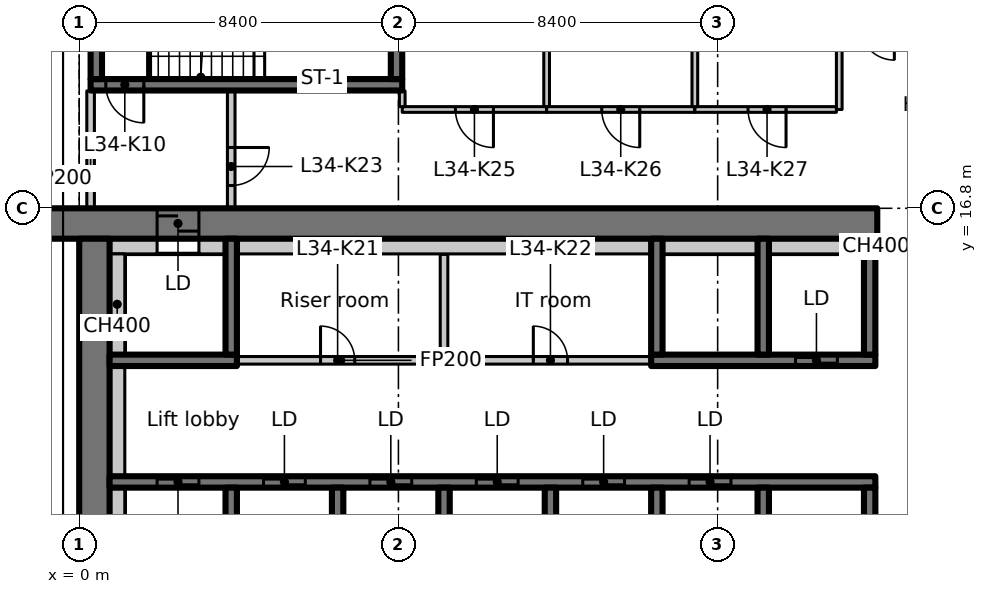
"""IFC4 building model, lengths in metres.
Left out: names, types, materials, properties, quantities, classifications, styles, units other than length and angle.
Written with IfcOpenShell. Run it as: python <this file> out.ifc"""

import sys

from ifc_helpers import new_model, si_unit, direction, frame, frame_2d, origin, place, context, subcontext, project, spatial, rectangle, extrude, element, fill, save


model = new_model("IFC4")
c1 = context("Model", 3, precision=1e-05, world=origin(), true_north=direction((0.0, 1.0)))
c2 = subcontext(c1, "Body", "Model", "MODEL_VIEW")
j1 = project(units=[si_unit("LENGTHUNIT", "METRE"), si_unit("PLANEANGLEUNIT", "RADIAN")], contexts=[c1])
p1 = place(None, origin())
s1 = spatial("IfcSite", under=j1, at=p1, CompositionType="ELEMENT")
p2 = place(p1, origin())
s2 = spatial("IfcBuilding", under=s1, at=p2, CompositionType="ELEMENT")
p3 = place(p2, frame((0.0, 0.0, 138.5)))
s3 = spatial("IfcBuildingStorey", under=s2, at=p3, CompositionType="ELEMENT", Elevation=138.5)
p4 = place(p3, frame((-1.1, 16.4, 0.0), z_axis=(0.0, 0.0, 1.0), x_axis=(1.0, 0.0, 0.0)))
e1 = element("IfcWall", 1, at=p4, inside=s3, PredefinedType="SHEAR", context=c2, shape_type="SweptSolid", body=[
    extrude(rectangle(XDim=22.1, YDim=0.8, at=frame_2d((11.05, 0.0))), origin(), (0.0, 0.0, 1.0), 3.35),
])
p5 = place(p4, frame((3.15, 0.0, 0.0)))
e2 = element("IfcOpeningElement", 2, at=p5, cuts=e1, PredefinedType="OPENING", context=c2, shape_type="SweptSolid", body=[
    extrude(rectangle(XDim=1.1, YDim=2.3, at=frame_2d((0.55, 1.15))), frame((0.0, 0.41, 0.0), z_axis=(0.0, -1.0, 0.0), x_axis=(1.0, 0.0, 0.0)), (0.0, 0.0, 1.0), 0.82),
])
p6 = place(p3, frame((0.4, 7.136, 0.0), z_axis=(0.0, 0.0, 1.0), x_axis=(0.0, 1.0, 0.0)))
e3 = element("IfcWall", 3, at=p6, inside=s3, PredefinedType="SHEAR", context=c2, shape_type="SweptSolid", body=[
    extrude(rectangle(XDim=8.864, YDim=0.8, at=frame_2d((4.432, 0.0))), origin(), (0.0, 0.0, 1.0), 3.35),
])
p7 = place(p3, frame((0.8, 15.8, 0.0), z_axis=(0.0, 0.0, 1.0), x_axis=(1.0, 0.0, 0.0)))
e4 = element("IfcWall", 4, at=p7, inside=s3, PredefinedType="PARTITIONING", context=c2, shape_type="SweptSolid", body=[
    extrude(rectangle(XDim=1.25, YDim=0.4, at=frame_2d((0.625, 0.0))), origin(), (0.0, 0.0, 1.0), 3.35),
])
p8 = place(p3, frame((0.8, 9.6, 0.0), z_axis=(0.0, 0.0, 1.0), x_axis=(1.0, 0.0, 0.0)))
e5 = element("IfcWall", 5, at=p8, inside=s3, PredefinedType="SHEAR", context=c2, shape_type="SweptSolid", body=[
    extrude(rectangle(XDim=20.15, YDim=0.3, at=frame_2d((10.075, 0.0))), origin(), (0.0, 0.0, 1.0), 3.35),
])
p9 = place(p8, frame((1.25, 0.0, 0.0)))
e6 = element("IfcOpeningElement", 6, at=p9, cuts=e5, PredefinedType="OPENING", context=c2, shape_type="SweptSolid", body=[
    extrude(rectangle(XDim=1.1, YDim=2.3, at=frame_2d((0.55, 1.15))), frame((0.0, 0.16, 0.0), z_axis=(0.0, -1.0, 0.0), x_axis=(1.0, 0.0, 0.0)), (0.0, 0.0, 1.0), 0.32),
])
p10 = place(p8, frame((4.05, 0.0, 0.0)))
e7 = element("IfcOpeningElement", 7, at=p10, cuts=e5, PredefinedType="OPENING", context=c2, shape_type="SweptSolid", body=[
    extrude(rectangle(XDim=1.1, YDim=2.3, at=frame_2d((0.55, 1.15))), frame((0.0, 0.16, 0.0), z_axis=(0.0, -1.0, 0.0), x_axis=(1.0, 0.0, 0.0)), (0.0, 0.0, 1.0), 0.32),
])
p11 = place(p8, frame((6.85, 0.0, 0.0)))
e8 = element("IfcOpeningElement", 8, at=p11, cuts=e5, PredefinedType="OPENING", context=c2, shape_type="SweptSolid", body=[
    extrude(rectangle(XDim=1.1, YDim=2.3, at=frame_2d((0.55, 1.15))), frame((0.0, 0.16, 0.0), z_axis=(0.0, -1.0, 0.0), x_axis=(1.0, 0.0, 0.0)), (0.0, 0.0, 1.0), 0.32),
])
p12 = place(p8, frame((9.65, 0.0, 0.0)))
e9 = element("IfcOpeningElement", 9, at=p12, cuts=e5, PredefinedType="OPENING", context=c2, shape_type="SweptSolid", body=[
    extrude(rectangle(XDim=1.1, YDim=2.3, at=frame_2d((0.55, 1.15))), frame((0.0, 0.16, 0.0), z_axis=(0.0, -1.0, 0.0), x_axis=(1.0, 0.0, 0.0)), (0.0, 0.0, 1.0), 0.32),
])
p13 = place(p8, frame((12.45, 0.0, 0.0)))
e10 = element("IfcOpeningElement", 10, at=p13, cuts=e5, PredefinedType="OPENING", context=c2, shape_type="SweptSolid", body=[
    extrude(rectangle(XDim=1.1, YDim=2.3, at=frame_2d((0.55, 1.15))), frame((0.0, 0.16, 0.0), z_axis=(0.0, -1.0, 0.0), x_axis=(1.0, 0.0, 0.0)), (0.0, 0.0, 1.0), 0.32),
])
p14 = place(p8, frame((15.25, 0.0, 0.0)))
e11 = element("IfcOpeningElement", 11, at=p14, cuts=e5, PredefinedType="OPENING", context=c2, shape_type="SweptSolid", body=[
    extrude(rectangle(XDim=1.1, YDim=2.3, at=frame_2d((0.55, 1.15))), frame((0.0, 0.16, 0.0), z_axis=(0.0, -1.0, 0.0), x_axis=(1.0, 0.0, 0.0)), (0.0, 0.0, 1.0), 0.32),
])
for number, where, z_axis, x_axis in (
    (12, (4.0, 7.15, 0.0), (0.0, 0.0, 1.0), (0.0, 1.0, 0.0)),
    (13, (6.8, 7.15, 0.0), (0.0, 0.0, 1.0), (0.0, 1.0, 0.0)),
    (14, (9.6, 7.15, 0.0), (0.0, 0.0, 1.0), (0.0, 1.0, 0.0)),
    (15, (12.4, 7.15, 0.0), (0.0, 0.0, 1.0), (0.0, 1.0, 0.0)),
    (16, (15.2, 7.15, 0.0), (0.0, 0.0, 1.0), (0.0, 1.0, 0.0)),
    (17, (18.0, 7.15, 0.0), (0.0, 0.0, 1.0), (0.0, 1.0, 0.0)),
    (18, (20.8, 7.15, 0.0), (0.0, 0.0, 1.0), (0.0, 1.0, 0.0)),
):
    element("IfcWall", number, at=place(p3, frame(where, z_axis=z_axis, x_axis=x_axis)), inside=s3, PredefinedType="SHEAR", context=c2, shape_type="SweptSolid", body=[
        extrude(rectangle(XDim=2.3, YDim=0.3, at=frame_2d((1.15, 0.0))), origin(), (0.0, 0.0, 1.0), 3.35),
    ])
p15 = place(p3, frame((0.8, 12.8, 0.0), z_axis=(0.0, 0.0, 1.0), x_axis=(1.0, 0.0, 0.0)))
e19 = element("IfcWall", 19, at=p15, inside=s3, PredefinedType="SHEAR", context=c2, shape_type="SweptSolid", body=[
    extrude(rectangle(XDim=3.35, YDim=0.3, at=frame_2d((1.675, 0.0))), origin(), (0.0, 0.0, 1.0), 3.35),
])
p16 = place(p3, frame((4.0, 12.95, 0.0), z_axis=(0.0, 0.0, 1.0), x_axis=(0.0, 1.0, 0.0)))
e20 = element("IfcWall", 20, at=p16, inside=s3, PredefinedType="SHEAR", context=c2, shape_type="SweptSolid", body=[
    extrude(rectangle(XDim=3.05, YDim=0.3, at=frame_2d((1.525, 0.0))), origin(), (0.0, 0.0, 1.0), 3.35),
])
p17 = place(p3, frame((15.05, 12.8, 0.0), z_axis=(0.0, 0.0, 1.0), x_axis=(1.0, 0.0, 0.0)))
e21 = element("IfcWall", 21, at=p17, inside=s3, PredefinedType="SHEAR", context=c2, shape_type="SweptSolid", body=[
    extrude(rectangle(XDim=5.9, YDim=0.3, at=frame_2d((2.95, 0.0))), origin(), (0.0, 0.0, 1.0), 3.35),
])
p18 = place(p17, frame((3.8, 0.0, 0.0)))
e22 = element("IfcOpeningElement", 22, at=p18, cuts=e21, PredefinedType="OPENING", context=c2, shape_type="SweptSolid", body=[
    extrude(rectangle(XDim=1.1, YDim=2.3, at=frame_2d((0.55, 1.15))), frame((0.0, 0.16, 0.0), z_axis=(0.0, -1.0, 0.0), x_axis=(1.0, 0.0, 0.0)), (0.0, 0.0, 1.0), 0.32),
])
for number, where, z_axis, x_axis in (
    (23, (15.2, 12.95, 0.0), (0.0, 0.0, 1.0), (0.0, 1.0, 0.0)),
    (24, (18.0, 12.95, 0.0), (0.0, 0.0, 1.0), (0.0, 1.0, 0.0)),
    (25, (20.8, 12.95, 0.0), (0.0, 0.0, 1.0), (0.0, 1.0, 0.0)),
):
    element("IfcWall", number, at=place(p3, frame(where, z_axis=z_axis, x_axis=x_axis)), inside=s3, PredefinedType="SHEAR", context=c2, shape_type="SweptSolid", body=[
        extrude(rectangle(XDim=3.05, YDim=0.3, at=frame_2d((1.525, 0.0))), origin(), (0.0, 0.0, 1.0), 3.35),
    ])
p19 = place(p3, frame((8.5, 20.05, 0.0), z_axis=(0.0, 0.0, 1.0), x_axis=(-1.0, 0.0, 0.0)))
e26 = element("IfcWall", 26, at=p19, inside=s3, PredefinedType="SHEAR", context=c2, shape_type="SweptSolid", body=[
    extrude(rectangle(XDim=8.2, YDim=0.3, at=frame_2d((4.1, 0.0))), origin(), (0.0, 0.0, 1.0), 3.35),
])
p20 = place(p19, frame((6.8, 0.0, 0.0)))
e27 = element("IfcOpeningElement", 27, at=p20, cuts=e26, PredefinedType="OPENING", context=c2, shape_type="SweptSolid", body=[
    extrude(rectangle(XDim=1.0, YDim=2.1, at=frame_2d((0.5, 1.05))), frame((0.0, 0.16, 0.0), z_axis=(0.0, -1.0, 0.0), x_axis=(1.0, 0.0, 0.0)), (0.0, 0.0, 1.0), 0.32),
])
for number, where, z_axis, x_axis in (
    (28, (0.45, 20.2, 0.0), (0.0, 0.0, 1.0), (0.0, 1.0, 0.0)),
    (29, (8.35, 20.2, 0.0), (0.0, 0.0, 1.0), (0.0, 1.0, 0.0)),
):
    element("IfcWall", number, at=place(p3, frame(where, z_axis=z_axis, x_axis=x_axis)), inside=s3, PredefinedType="SHEAR", context=c2, shape_type="SweptSolid", body=[
        extrude(rectangle(XDim=2.55, YDim=0.3, at=frame_2d((1.275, 0.0))), origin(), (0.0, 0.0, 1.0), 3.35),
    ])
p21 = place(p3, frame((0.3, 16.812, 0.0), z_axis=(0.0, 0.0, 1.0), x_axis=(0.0, 1.0, 0.0)))
e30 = element("IfcWall", 30, at=p21, inside=s3, PredefinedType="PARTITIONING", context=c2, shape_type="SweptSolid", body=[
    extrude(rectangle(XDim=3.076, YDim=0.2, at=frame_2d((1.538, 0.0))), origin(), (0.0, 0.0, 1.0), 2.98),
])
p22 = place(p3, frame((4.0, 19.888, 0.0), z_axis=(0.0, 0.0, 1.0), x_axis=(0.0, -1.0, 0.0)))
e31 = element("IfcWall", 31, at=p22, inside=s3, PredefinedType="PARTITIONING", context=c2, shape_type="SweptSolid", body=[
    extrude(rectangle(XDim=3.076, YDim=0.2, at=frame_2d((1.538, 0.0))), origin(), (0.0, 0.0, 1.0), 3.35),
])
p23 = place(p22, frame((1.488, 0.0, 0.0)))
e32 = element("IfcOpeningElement", 32, at=p23, cuts=e31, PredefinedType="OPENING", context=c2, shape_type="SweptSolid", body=[
    extrude(rectangle(XDim=1.0, YDim=2.1, at=frame_2d((0.5, 1.05))), frame((0.0, 0.11, 0.0), z_axis=(0.0, -1.0, 0.0), x_axis=(1.0, 0.0, 0.0)), (0.0, 0.0, 1.0), 0.22),
])
p24 = place(p3, frame((4.162, 12.8, 0.0), z_axis=(0.0, 0.0, 1.0), x_axis=(1.0, 0.0, 0.0)))
e33 = element("IfcWall", 33, at=p24, inside=s3, PredefinedType="PARTITIONING", context=c2, shape_type="SweptSolid", body=[
    extrude(rectangle(XDim=5.438, YDim=0.2, at=frame_2d((2.719, 0.0))), origin(), (0.0, 0.0, 1.0), 3.35),
])
p25 = place(p24, frame((2.188, 0.0, 0.0)))
e34 = element("IfcOpeningElement", 34, at=p25, cuts=e33, PredefinedType="OPENING", context=c2, shape_type="SweptSolid", body=[
    extrude(rectangle(XDim=0.9, YDim=2.1, at=frame_2d((0.45, 1.05))), frame((0.0, 0.11, 0.0), z_axis=(0.0, -1.0, 0.0), x_axis=(1.0, 0.0, 0.0)), (0.0, 0.0, 1.0), 0.22),
])
p26 = place(p3, frame((9.6, 12.8, 0.0), z_axis=(0.0, 0.0, 1.0), x_axis=(1.0, 0.0, 0.0)))
e35 = element("IfcWall", 35, at=p26, inside=s3, PredefinedType="PARTITIONING", context=c2, shape_type="SweptSolid", body=[
    extrude(rectangle(XDim=5.438, YDim=0.2, at=frame_2d((2.719, 0.0))), origin(), (0.0, 0.0, 1.0), 3.35),
])
p27 = place(p26, frame((2.35, 0.0, 0.0)))
e36 = element("IfcOpeningElement", 36, at=p27, cuts=e35, PredefinedType="OPENING", context=c2, shape_type="SweptSolid", body=[
    extrude(rectangle(XDim=0.9, YDim=2.1, at=frame_2d((0.45, 1.05))), frame((0.0, 0.11, 0.0), z_axis=(0.0, -1.0, 0.0), x_axis=(1.0, 0.0, 0.0)), (0.0, 0.0, 1.0), 0.22),
])
p28 = place(p3, frame((9.6, 15.588, 0.0), z_axis=(0.0, 0.0, 1.0), x_axis=(0.0, -1.0, 0.0)))
e37 = element("IfcWall", 37, at=p28, inside=s3, PredefinedType="PARTITIONING", context=c2, shape_type="SweptSolid", body=[
    extrude(rectangle(XDim=2.688, YDim=0.2, at=frame_2d((1.344, 0.0))), origin(), (0.0, 0.0, 1.0), 3.35),
])
p29 = place(p3, frame((12.3, 19.4, 0.0), z_axis=(0.0, 0.0, 1.0), x_axis=(-1.0, 0.0, 0.0)))
e38 = element("IfcWall", 38, at=p29, inside=s3, PredefinedType="PARTITIONING", context=c2, shape_type="SweptSolid", body=[
    extrude(rectangle(XDim=3.8, YDim=0.15, at=frame_2d((1.9, 0.0))), origin(), (0.0, 0.0, 1.0), 3.35),
])
p30 = place(p29, frame((1.4, 0.0, 0.0)))
e39 = element("IfcOpeningElement", 39, at=p30, cuts=e38, PredefinedType="OPENING", context=c2, shape_type="SweptSolid", body=[
    extrude(rectangle(XDim=1.0, YDim=2.1, at=frame_2d((0.5, 1.05))), frame((0.0, 0.085, 0.0), z_axis=(0.0, -1.0, 0.0), x_axis=(1.0, 0.0, 0.0)), (0.0, 0.0, 1.0), 0.17),
])
p31 = place(p3, frame((8.5, 19.475, 0.0), z_axis=(0.0, 0.0, 1.0), x_axis=(0.0, 1.0, 0.0)))
e40 = element("IfcWall", 40, at=p31, inside=s3, PredefinedType="PARTITIONING", context=c2, shape_type="SweptSolid", body=[
    extrude(rectangle(XDim=0.413, YDim=0.15, at=frame_2d((0.207, 0.0))), origin(), (0.0, 0.0, 1.0), 3.35),
])
p32 = place(p3, frame((16.2, 19.4, 0.0), z_axis=(0.0, 0.0, 1.0), x_axis=(-1.0, 0.0, 0.0)))
e41 = element("IfcWall", 41, at=p32, inside=s3, PredefinedType="PARTITIONING", context=c2, shape_type="SweptSolid", body=[
    extrude(rectangle(XDim=3.9, YDim=0.15, at=frame_2d((1.95, 0.0))), origin(), (0.0, 0.0, 1.0), 3.35),
])
p33 = place(p32, frame((1.45, 0.0, 0.0)))
e42 = element("IfcOpeningElement", 42, at=p33, cuts=e41, PredefinedType="OPENING", context=c2, shape_type="SweptSolid", body=[
    extrude(rectangle(XDim=1.0, YDim=2.1, at=frame_2d((0.5, 1.05))), frame((0.0, 0.085, 0.0), z_axis=(0.0, -1.0, 0.0), x_axis=(1.0, 0.0, 0.0)), (0.0, 0.0, 1.0), 0.17),
])
p34 = place(p3, frame((12.3, 23.825, 0.0), z_axis=(0.0, 0.0, 1.0), x_axis=(0.0, -1.0, 0.0)))
e43 = element("IfcWall", 43, at=p34, inside=s3, PredefinedType="PARTITIONING", context=c2, shape_type="SweptSolid", body=[
    extrude(rectangle(XDim=4.35, YDim=0.15, at=frame_2d((2.175, 0.0))), origin(), (0.0, 0.0, 1.0), 3.35),
])
p35 = place(p3, frame((20.0, 21.6, 0.0), z_axis=(0.0, 0.0, 1.0), x_axis=(0.0, -1.0, 0.0)))
e44 = element("IfcWall", 44, at=p35, inside=s3, PredefinedType="PARTITIONING", context=c2, shape_type="SweptSolid", body=[
    extrude(rectangle(XDim=2.2, YDim=0.15, at=frame_2d((1.1, 0.0))), origin(), (0.0, 0.0, 1.0), 3.35),
])
p36 = place(p3, frame((19.925, 19.4, 0.0), z_axis=(0.0, 0.0, 1.0), x_axis=(-1.0, 0.0, 0.0)))
e45 = element("IfcWall", 45, at=p36, inside=s3, PredefinedType="PARTITIONING", context=c2, shape_type="SweptSolid", body=[
    extrude(rectangle(XDim=3.725, YDim=0.15, at=frame_2d((1.863, 0.0))), origin(), (0.0, 0.0, 1.0), 3.35),
])
p37 = place(p36, frame((1.325, 0.0, 0.0)))
e46 = element("IfcOpeningElement", 46, at=p37, cuts=e45, PredefinedType="OPENING", context=c2, shape_type="SweptSolid", body=[
    extrude(rectangle(XDim=1.0, YDim=2.1, at=frame_2d((0.5, 1.05))), frame((0.0, 0.085, 0.0), z_axis=(0.0, -1.0, 0.0), x_axis=(1.0, 0.0, 0.0)), (0.0, 0.0, 1.0), 0.17),
])
p38 = place(p3, frame((16.2, 23.825, 0.0), z_axis=(0.0, 0.0, 1.0), x_axis=(0.0, -1.0, 0.0)))
e47 = element("IfcWall", 47, at=p38, inside=s3, PredefinedType="PARTITIONING", context=c2, shape_type="SweptSolid", body=[
    extrude(rectangle(XDim=4.35, YDim=0.15, at=frame_2d((2.175, 0.0))), origin(), (0.0, 0.0, 1.0), 3.35),
])
p39 = place(p3, frame((1.0, 7.15, 0.0), z_axis=(0.0, 0.0, 1.0), x_axis=(0.0, 1.0, 0.0)))
e48 = element("IfcWall", 48, at=p39, inside=s3, PredefinedType="PARTITIONING", context=c2, shape_type="SweptSolid", body=[
    extrude(rectangle(XDim=2.3, YDim=0.4, at=frame_2d((1.15, 0.0))), origin(), (0.0, 0.0, 1.0), 3.35),
])
p40 = place(p3, frame((1.0, 9.75, 0.0), z_axis=(0.0, 0.0, 1.0), x_axis=(0.0, 1.0, 0.0)))
e49 = element("IfcWall", 49, at=p40, inside=s3, PredefinedType="PARTITIONING", context=c2, shape_type="SweptSolid", body=[
    extrude(rectangle(XDim=2.9, YDim=0.4, at=frame_2d((1.45, 0.0))), origin(), (0.0, 0.0, 1.0), 3.35),
])
p41 = place(p3, frame((1.0, 12.95, 0.0), z_axis=(0.0, 0.0, 1.0), x_axis=(0.0, 1.0, 0.0)))
e50 = element("IfcWall", 50, at=p41, inside=s3, PredefinedType="PARTITIONING", context=c2, shape_type="SweptSolid", body=[
    extrude(rectangle(XDim=2.65, YDim=0.4, at=frame_2d((1.325, 0.0))), origin(), (0.0, 0.0, 1.0), 3.35),
])
p42 = place(p3, frame((3.15, 15.8, 0.0), z_axis=(0.0, 0.0, 1.0), x_axis=(1.0, 0.0, 0.0)))
e51 = element("IfcWall", 51, at=p42, inside=s3, PredefinedType="PARTITIONING", context=c2, shape_type="SweptSolid", body=[
    extrude(rectangle(XDim=0.7, YDim=0.4, at=frame_2d((0.35, 0.0))), origin(), (0.0, 0.0, 1.0), 3.35),
])
p43 = place(p3, frame((4.15, 15.8, 0.0), z_axis=(0.0, 0.0, 1.0), x_axis=(1.0, 0.0, 0.0)))
e52 = element("IfcWall", 52, at=p43, inside=s3, PredefinedType="PARTITIONING", context=c2, shape_type="SweptSolid", body=[
    extrude(rectangle(XDim=10.9, YDim=0.4, at=frame_2d((5.45, 0.0))), origin(), (0.0, 0.0, 1.0), 3.35),
])
for number, where, z_axis, x_axis in (
    (53, (15.35, 15.8, 0.0), (0.0, 0.0, 1.0), (1.0, 0.0, 0.0)),
    (54, (18.15, 15.8, 0.0), (0.0, 0.0, 1.0), (1.0, 0.0, 0.0)),
):
    element("IfcWall", number, at=place(p3, frame(where, z_axis=z_axis, x_axis=x_axis)), inside=s3, PredefinedType="PARTITIONING", context=c2, shape_type="SweptSolid", body=[
        extrude(rectangle(XDim=2.5, YDim=0.4, at=frame_2d((1.25, 0.0))), origin(), (0.0, 0.0, 1.0), 3.35),
    ])
p44 = place(p3, frame((20.95, 15.8, 0.0), z_axis=(0.0, 0.0, 1.0), x_axis=(1.0, 0.0, 0.0)))
e55 = element("IfcWall", 55, at=p44, inside=s3, PredefinedType="PARTITIONING", context=c2, shape_type="SweptSolid", body=[
    extrude(rectangle(XDim=0.05, YDim=0.4, at=frame_2d((0.025, 0.0))), origin(), (0.0, 0.0, 1.0), 3.35),
])
p45 = place(p9, origin())
e56 = element("IfcDoor", 56, at=p45, inside=s3, OperationType="SLIDING_TO_LEFT", PredefinedType="DOOR", context=c2, shape_type="SweptSolid", body=[
    extrude(rectangle(XDim=1.1, YDim=2.3, at=frame_2d((0.55, 1.15))), frame((0.0, 0.025, 0.0), z_axis=(0.0, -1.0, 0.0), x_axis=(1.0, 0.0, 0.0)), (0.0, 0.0, 1.0), 0.05),
])
fill(e6, e56)
p46 = place(p10, origin())
e57 = element("IfcDoor", 57, at=p46, inside=s3, OperationType="SLIDING_TO_LEFT", PredefinedType="DOOR", context=c2, shape_type="SweptSolid", body=[
    extrude(rectangle(XDim=1.1, YDim=2.3, at=frame_2d((0.55, 1.15))), frame((0.0, 0.025, 0.0), z_axis=(0.0, -1.0, 0.0), x_axis=(1.0, 0.0, 0.0)), (0.0, 0.0, 1.0), 0.05),
])
fill(e7, e57)
p47 = place(p11, origin())
e58 = element("IfcDoor", 58, at=p47, inside=s3, OperationType="SLIDING_TO_LEFT", PredefinedType="DOOR", context=c2, shape_type="SweptSolid", body=[
    extrude(rectangle(XDim=1.1, YDim=2.3, at=frame_2d((0.55, 1.15))), frame((0.0, 0.025, 0.0), z_axis=(0.0, -1.0, 0.0), x_axis=(1.0, 0.0, 0.0)), (0.0, 0.0, 1.0), 0.05),
])
fill(e8, e58)
p48 = place(p12, origin())
e59 = element("IfcDoor", 59, at=p48, inside=s3, OperationType="SLIDING_TO_LEFT", PredefinedType="DOOR", context=c2, shape_type="SweptSolid", body=[
    extrude(rectangle(XDim=1.1, YDim=2.3, at=frame_2d((0.55, 1.15))), frame((0.0, 0.025, 0.0), z_axis=(0.0, -1.0, 0.0), x_axis=(1.0, 0.0, 0.0)), (0.0, 0.0, 1.0), 0.05),
])
fill(e9, e59)
p49 = place(p13, origin())
e60 = element("IfcDoor", 60, at=p49, inside=s3, OperationType="SLIDING_TO_LEFT", PredefinedType="DOOR", context=c2, shape_type="SweptSolid", body=[
    extrude(rectangle(XDim=1.1, YDim=2.3, at=frame_2d((0.55, 1.15))), frame((0.0, 0.025, 0.0), z_axis=(0.0, -1.0, 0.0), x_axis=(1.0, 0.0, 0.0)), (0.0, 0.0, 1.0), 0.05),
])
fill(e10, e60)
p50 = place(p14, origin())
e61 = element("IfcDoor", 61, at=p50, inside=s3, OperationType="SLIDING_TO_LEFT", PredefinedType="DOOR", context=c2, shape_type="SweptSolid", body=[
    extrude(rectangle(XDim=1.1, YDim=2.3, at=frame_2d((0.55, 1.15))), frame((0.0, 0.025, 0.0), z_axis=(0.0, -1.0, 0.0), x_axis=(1.0, 0.0, 0.0)), (0.0, 0.0, 1.0), 0.05),
])
fill(e11, e61)
p51 = place(p5, origin())
e62 = element("IfcDoor", 62, at=p51, inside=s3, OperationType="SLIDING_TO_LEFT", PredefinedType="DOOR", context=c2, shape_type="SweptSolid", body=[
    extrude(rectangle(XDim=1.1, YDim=2.3, at=frame_2d((0.55, 1.15))), frame((0.0, 0.025, 0.0), z_axis=(0.0, -1.0, 0.0), x_axis=(1.0, 0.0, 0.0)), (0.0, 0.0, 1.0), 0.05),
])
fill(e2, e62)
p52 = place(p18, origin())
e63 = element("IfcDoor", 63, at=p52, inside=s3, OperationType="SLIDING_TO_LEFT", PredefinedType="DOOR", context=c2, shape_type="SweptSolid", body=[
    extrude(rectangle(XDim=1.1, YDim=2.3, at=frame_2d((0.55, 1.15))), frame((0.0, 0.025, 0.0), z_axis=(0.0, -1.0, 0.0), x_axis=(1.0, 0.0, 0.0)), (0.0, 0.0, 1.0), 0.05),
])
fill(e22, e63)
p53 = place(p20, origin())
e64 = element("IfcDoor", 64, at=p53, inside=s3, OperationType="SINGLE_SWING_RIGHT", PredefinedType="DOOR", context=c2, shape_type="SweptSolid", body=[
    extrude(rectangle(XDim=1.0, YDim=2.1, at=frame_2d((0.5, 1.05))), frame((0.0, 0.025, 0.0), z_axis=(0.0, -1.0, 0.0), x_axis=(1.0, 0.0, 0.0)), (0.0, 0.0, 1.0), 0.05),
])
fill(e27, e64)
p54 = place(p25, origin())
e65 = element("IfcDoor", 65, at=p54, inside=s3, OperationType="SINGLE_SWING_LEFT", PredefinedType="DOOR", context=c2, shape_type="SweptSolid", body=[
    extrude(rectangle(XDim=0.9, YDim=2.1, at=frame_2d((0.45, 1.05))), frame((0.0, 0.025, 0.0), z_axis=(0.0, -1.0, 0.0), x_axis=(1.0, 0.0, 0.0)), (0.0, 0.0, 1.0), 0.05),
])
fill(e34, e65)
p55 = place(p27, origin())
e66 = element("IfcDoor", 66, at=p55, inside=s3, OperationType="SINGLE_SWING_RIGHT", PredefinedType="DOOR", context=c2, shape_type="SweptSolid", body=[
    extrude(rectangle(XDim=0.9, YDim=2.1, at=frame_2d((0.45, 1.05))), frame((0.0, 0.025, 0.0), z_axis=(0.0, -1.0, 0.0), x_axis=(1.0, 0.0, 0.0)), (0.0, 0.0, 1.0), 0.05),
])
fill(e36, e66)
p56 = place(p23, origin())
e67 = element("IfcDoor", 67, at=p56, inside=s3, OperationType="SINGLE_SWING_LEFT", PredefinedType="DOOR", context=c2, shape_type="SweptSolid", body=[
    extrude(rectangle(XDim=1.0, YDim=2.1, at=frame_2d((0.5, 1.05))), frame((0.0, 0.025, 0.0), z_axis=(0.0, -1.0, 0.0), x_axis=(1.0, 0.0, 0.0)), (0.0, 0.0, 1.0), 0.05),
])
fill(e32, e67)
p57 = place(p30, origin())
e68 = element("IfcDoor", 68, at=p57, inside=s3, OperationType="SINGLE_SWING_LEFT", PredefinedType="DOOR", context=c2, shape_type="SweptSolid", body=[
    extrude(rectangle(XDim=1.0, YDim=2.1, at=frame_2d((0.5, 1.05))), frame((0.0, 0.025, 0.0), z_axis=(0.0, -1.0, 0.0), x_axis=(1.0, 0.0, 0.0)), (0.0, 0.0, 1.0), 0.05),
])
fill(e39, e68)
p58 = place(p33, origin())
e69 = element("IfcDoor", 69, at=p58, inside=s3, OperationType="SINGLE_SWING_RIGHT", PredefinedType="DOOR", context=c2, shape_type="SweptSolid", body=[
    extrude(rectangle(XDim=1.0, YDim=2.1, at=frame_2d((0.5, 1.05))), frame((0.0, 0.025, 0.0), z_axis=(0.0, -1.0, 0.0), x_axis=(1.0, 0.0, 0.0)), (0.0, 0.0, 1.0), 0.05),
])
fill(e42, e69)
p59 = place(p37, origin())
e70 = element("IfcDoor", 70, at=p59, inside=s3, OperationType="SINGLE_SWING_LEFT", PredefinedType="DOOR", context=c2, shape_type="SweptSolid", body=[
    extrude(rectangle(XDim=1.0, YDim=2.1, at=frame_2d((0.5, 1.05))), frame((0.0, 0.025, 0.0), z_axis=(0.0, -1.0, 0.0), x_axis=(1.0, 0.0, 0.0)), (0.0, 0.0, 1.0), 0.05),
])
fill(e46, e70)
save(model, sys.argv[1])
